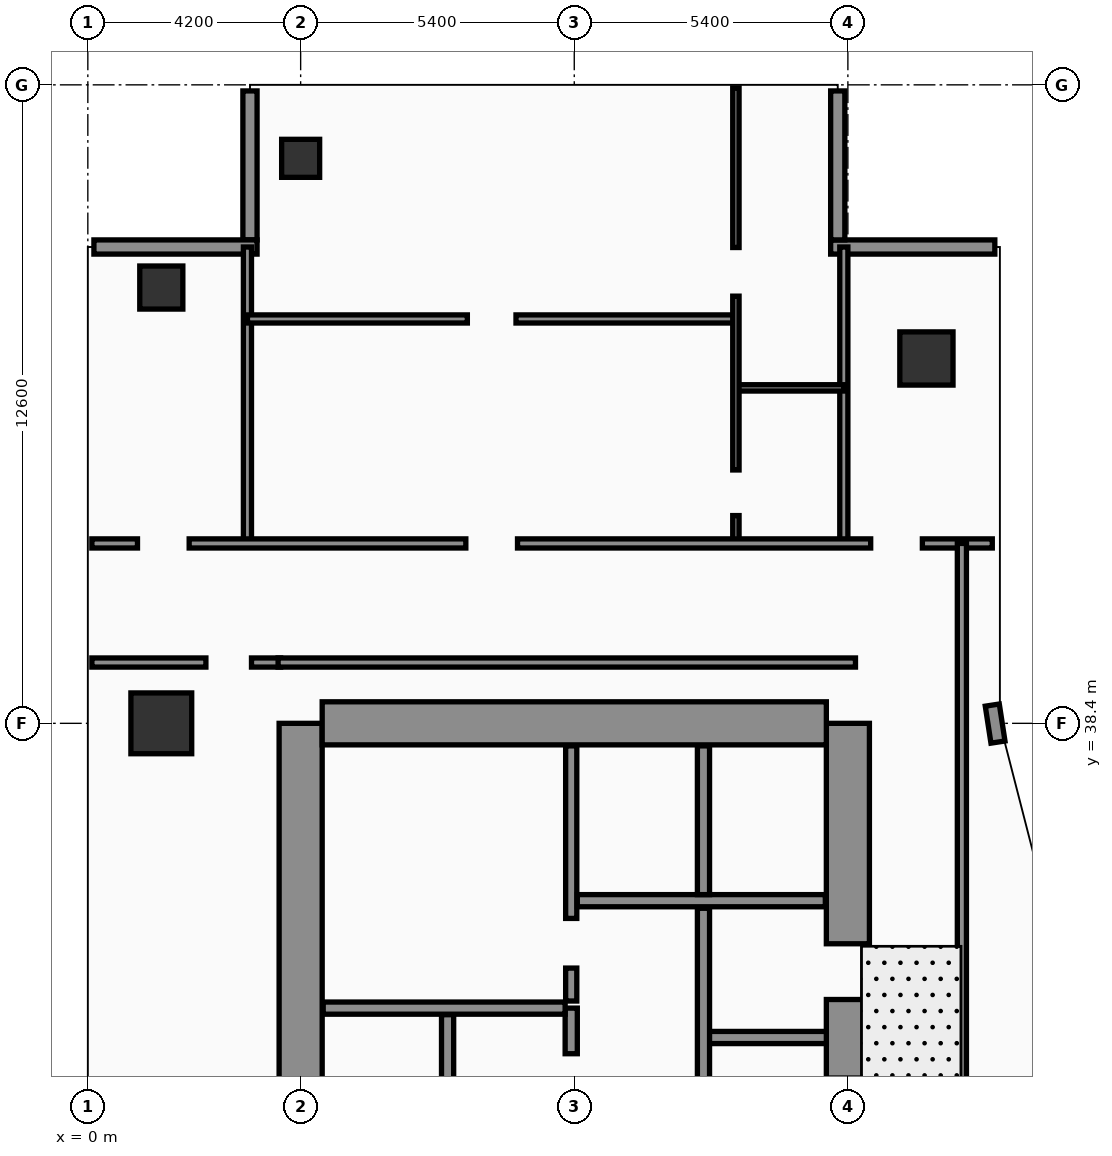
"""IFC4 building model, lengths in metres.
Left out: names, types, materials, properties, quantities, classifications, styles, units other than length and angle.
Written with IfcOpenShell. Run it as: python <this file> out.ifc"""

import sys

from ifc_helpers import new_model, si_unit, direction, frame, frame_2d, origin, origin_2d, place, context, subcontext, project, spatial, rectangle, hollow_rectangle, extrude, element, fill, save


model = new_model("IFC4")
c1 = context("Model", 3, precision=1e-05, world=origin(), true_north=direction((0.0, 1.0)))
c2 = subcontext(c1, "Body", "Model", "MODEL_VIEW")
j1 = project(units=[si_unit("LENGTHUNIT", "METRE"), si_unit("PLANEANGLEUNIT", "RADIAN")], contexts=[c1])
p1 = place(None, origin())
s1 = spatial("IfcSite", under=j1, at=p1, CompositionType="ELEMENT")
p2 = place(p1, origin())
s2 = spatial("IfcBuilding", under=s1, at=p2, CompositionType="ELEMENT")
p3 = place(p2, frame((0.0, 0.0, 171.3)))
s3 = spatial("IfcBuildingStorey", under=s2, at=p3, CompositionType="ELEMENT", Elevation=171.3)
p4 = place(p3, frame((4.2, 16.8, 0.0), z_axis=(0.0, 0.0, 1.0), x_axis=(0.0, 1.0, 0.0)))
e1 = element("IfcWall", 1, at=p4, inside=s3, PredefinedType="SHEAR", context=c2, shape_type="SweptSolid", body=[
    extrude(rectangle(XDim=21.6, YDim=0.85, at=frame_2d((10.8, 0.0))), origin(), (0.0, 0.0, 1.0), 3.56),
])
p5 = place(p3, frame((15.0, 16.8, 0.0), z_axis=(0.0, 0.0, 1.0), x_axis=(0.0, 1.0, 0.0)))
e2 = element("IfcWall", 2, at=p5, inside=s3, PredefinedType="SHEAR", context=c2, shape_type="SweptSolid", body=[
    extrude(rectangle(XDim=21.6, YDim=0.85, at=frame_2d((10.8, 0.0))), origin(), (0.0, 0.0, 1.0), 3.56),
])
p6 = place(p5, frame((8.65, 0.0, 0.0)))
e3 = element("IfcOpeningElement", 3, at=p6, cuts=e2, PredefinedType="OPENING", context=c2, shape_type="SweptSolid", body=[
    extrude(rectangle(XDim=1.1, YDim=2.2, at=frame_2d((0.55, 1.1))), frame((0.0, 0.435, 0.0), z_axis=(0.0, -1.0, 0.0), x_axis=(1.0, 0.0, 0.0)), (0.0, 0.0, 1.0), 0.87),
])
p7 = place(p5, frame((10.85, 0.0, 0.0)))
e4 = element("IfcOpeningElement", 4, at=p7, cuts=e2, PredefinedType="OPENING", context=c2, shape_type="SweptSolid", body=[
    extrude(rectangle(XDim=1.1, YDim=2.2, at=frame_2d((0.55, 1.1))), frame((0.0, 0.435, 0.0), z_axis=(0.0, -1.0, 0.0), x_axis=(1.0, 0.0, 0.0)), (0.0, 0.0, 1.0), 0.87),
])
p8 = place(p5, frame((13.5, 0.0, 0.0)))
e5 = element("IfcOpeningElement", 5, at=p8, cuts=e2, PredefinedType="OPENING", context=c2, shape_type="SweptSolid", body=[
    extrude(rectangle(XDim=1.1, YDim=2.2, at=frame_2d((0.55, 1.1))), frame((0.0, 0.435, 0.0), z_axis=(0.0, -1.0, 0.0), x_axis=(1.0, 0.0, 0.0)), (0.0, 0.0, 1.0), 0.87),
])
p9 = place(p5, frame((16.15, 0.0, 0.0)))
e6 = element("IfcOpeningElement", 6, at=p9, cuts=e2, PredefinedType="OPENING", context=c2, shape_type="SweptSolid", body=[
    extrude(rectangle(XDim=1.1, YDim=2.2, at=frame_2d((0.55, 1.1))), frame((0.0, 0.435, 0.0), z_axis=(0.0, -1.0, 0.0), x_axis=(1.0, 0.0, 0.0)), (0.0, 0.0, 1.0), 0.87),
])
p10 = place(p3, frame((4.625, 38.4, 0.0), z_axis=(0.0, 0.0, 1.0), x_axis=(1.0, 0.0, 0.0)))
e7 = element("IfcWall", 7, at=p10, inside=s3, PredefinedType="SHEAR", context=c2, shape_type="SweptSolid", body=[
    extrude(rectangle(XDim=9.95, YDim=0.85, at=frame_2d((4.975, 0.0))), origin(), (0.0, 0.0, 1.0), 3.56),
])
p11 = place(p3, frame((12.18, 32.2, 0.0), z_axis=(0.0, 0.0, 1.0), x_axis=(1.0, 0.0, 0.0)))
e8 = element("IfcWall", 8, at=p11, inside=s3, PredefinedType="SOLIDWALL", context=c2, shape_type="SweptSolid", body=[
    extrude(rectangle(XDim=2.395, YDim=0.24, at=frame_2d((1.198, 0.0))), origin(), (0.0, 0.0, 1.0), 3.56),
])
p12 = place(p3, frame((1.45, 38.4, 0.0), z_axis=(0.0, 0.0, 1.0), x_axis=(1.0, 0.0, 0.0)))
e9 = element("IfcColumn", 9, at=p12, inside=s3, PredefinedType="COLUMN", context=c2, shape_type="SweptSolid", body=[
    extrude(rectangle(XDim=1.2, YDim=1.2, at=origin_2d()), origin(), (0.0, 0.0, 1.0), 3.56),
])
p13 = place(p3, frame((1.45, 47.0, 0.0), z_axis=(0.0, 0.0, 1.0), x_axis=(1.0, 0.0, 0.0)))
e10 = element("IfcColumn", 10, at=p13, inside=s3, PredefinedType="COLUMN", context=c2, shape_type="SweptSolid", body=[
    extrude(hollow_rectangle(XDim=0.85, YDim=0.85, WallThickness=0.036, at=origin_2d()), origin(), (0.0, 0.0, 1.0), 3.56),
])
p14 = place(p3, frame((4.2, 49.55, 0.0), z_axis=(0.0, 0.0, 1.0), x_axis=(1.0, 0.0, 0.0)))
e11 = element("IfcColumn", 11, at=p14, inside=s3, PredefinedType="COLUMN", context=c2, shape_type="SweptSolid", body=[
    extrude(hollow_rectangle(XDim=0.75, YDim=0.75, WallThickness=0.032, at=origin_2d()), origin(), (0.0, 0.0, 1.0), 3.56),
])
p15 = place(p3, frame((16.55, 45.6, 0.0), z_axis=(0.0, 0.0, 1.0), x_axis=(1.0, 0.0, 0.0)))
e12 = element("IfcColumn", 12, at=p15, inside=s3, PredefinedType="COLUMN", context=c2, shape_type="SweptSolid", body=[
    extrude(rectangle(XDim=1.05, YDim=1.05, at=origin_2d()), origin(), (0.0, 0.0, 1.0), 3.56),
])
p16 = place(p3, frame((17.962, 38.03, 0.0), z_axis=(0.0, 0.0, 1.0), x_axis=(-0.15141125477, 0.988470855377, 0.0)))
e13 = element("IfcWall", 13, at=p16, inside=s3, PredefinedType="SOLIDWALL", context=c2, shape_type="SweptSolid", body=[
    extrude(rectangle(XDim=0.739, YDim=0.28, at=frame_2d((0.369, 0.0))), origin(), (0.0, 0.0, 1.0), 3.56),
])
p17 = place(p3, frame((17.9, 47.8, 0.0), z_axis=(0.0, 0.0, 1.0), x_axis=(-1.0, 0.0, 0.0)))
e14 = element("IfcWall", 14, at=p17, inside=s3, PredefinedType="SOLIDWALL", context=c2, shape_type="SweptSolid", body=[
    extrude(rectangle(XDim=3.24, YDim=0.28, at=frame_2d((1.62, 0.0))), origin(), (0.0, 0.0, 1.0), 3.56),
])
p18 = place(p3, frame((14.8, 47.94, 0.0), z_axis=(0.0, 0.0, 1.0), x_axis=(0.0, 1.0, 0.0)))
e15 = element("IfcWall", 15, at=p18, inside=s3, PredefinedType="SOLIDWALL", context=c2, shape_type="SweptSolid", body=[
    extrude(rectangle(XDim=2.94, YDim=0.28, at=frame_2d((1.47, 0.0))), origin(), (0.0, 0.0, 1.0), 3.56),
])
p19 = place(p3, frame((3.2, 50.88, 0.0), z_axis=(0.0, 0.0, 1.0), x_axis=(0.0, -1.0, 0.0)))
e16 = element("IfcWall", 16, at=p19, inside=s3, PredefinedType="SOLIDWALL", context=c2, shape_type="SweptSolid", body=[
    extrude(rectangle(XDim=2.94, YDim=0.28, at=frame_2d((1.47, 0.0))), origin(), (0.0, 0.0, 1.0), 3.04),
])
p20 = place(p3, frame((3.34, 47.8, 0.0), z_axis=(0.0, 0.0, 1.0), x_axis=(-1.0, 0.0, 0.0)))
e17 = element("IfcWall", 17, at=p20, inside=s3, PredefinedType="SOLIDWALL", context=c2, shape_type="SweptSolid", body=[
    extrude(rectangle(XDim=3.22, YDim=0.28, at=frame_2d((1.61, 0.0))), origin(), (0.0, 0.0, 1.0), 3.04),
])
p21 = place(p3, frame((7.1, 30.02, 0.0), z_axis=(0.0, 0.0, 1.0), x_axis=(0.0, 1.0, 0.0)))
e18 = element("IfcWall", 18, at=p21, inside=s3, PredefinedType="SOLIDWALL", context=c2, shape_type="SweptSolid", body=[
    extrude(rectangle(XDim=2.63, YDim=0.24, at=frame_2d((1.315, 0.0))), origin(), (0.0, 0.0, 1.0), 3.56),
])
p22 = place(p3, frame((9.54, 29.88, 0.0), z_axis=(0.0, 0.0, 1.0), x_axis=(0.0, 1.0, 0.0)))
e19 = element("IfcWall", 19, at=p22, inside=s3, PredefinedType="SOLIDWALL", context=c2, shape_type="SweptSolid", body=[
    extrude(rectangle(XDim=2.9, YDim=0.24, at=frame_2d((1.45, 0.0))), origin(), (0.0, 0.0, 1.0), 3.56),
])
p23 = place(p22, frame((0.7, 0.0, 0.0)))
e20 = element("IfcOpeningElement", 20, at=p23, cuts=e19, PredefinedType="OPENING", context=c2, shape_type="SweptSolid", body=[
    extrude(rectangle(XDim=1.3, YDim=2.35, at=frame_2d((0.65, 1.175))), frame((0.0, 0.13, 0.0), z_axis=(0.0, -1.0, 0.0), x_axis=(1.0, 0.0, 0.0)), (0.0, 0.0, 1.0), 0.26),
])
p24 = place(p3, frame((4.645, 32.78, 0.0), z_axis=(0.0, 0.0, 1.0), x_axis=(1.0, 0.0, 0.0)))
e21 = element("IfcWall", 21, at=p24, inside=s3, PredefinedType="SOLIDWALL", context=c2, shape_type="SweptSolid", body=[
    extrude(rectangle(XDim=4.775, YDim=0.24, at=frame_2d((2.387, 0.0))), origin(), (0.0, 0.0, 1.0), 3.19),
])
p25 = place(p3, frame((9.54, 32.92, 0.0), z_axis=(0.0, 0.0, 1.0), x_axis=(0.0, 1.0, 0.0)))
e22 = element("IfcWall", 22, at=p25, inside=s3, PredefinedType="SOLIDWALL", context=c2, shape_type="SweptSolid", body=[
    extrude(rectangle(XDim=5.035, YDim=0.22, at=frame_2d((2.518, 0.0))), origin(), (0.0, 0.0, 1.0), 3.56),
])
p26 = place(p25, frame((0.65, 0.0, 0.0)))
e23 = element("IfcOpeningElement", 23, at=p26, cuts=e22, PredefinedType="OPENING", context=c2, shape_type="SweptSolid", body=[
    extrude(rectangle(XDim=0.98, YDim=2.15, at=frame_2d((0.49, 1.075))), frame((0.0, 0.12, 0.0), z_axis=(0.0, -1.0, 0.0), x_axis=(1.0, 0.0, 0.0)), (0.0, 0.0, 1.0), 0.24),
])
p27 = place(p3, frame((12.15, 27.0, 0.0), z_axis=(0.0, 0.0, 1.0), x_axis=(0.0, 1.0, 0.0)))
e24 = element("IfcWall", 24, at=p27, inside=s3, PredefinedType="SOLIDWALL", context=c2, shape_type="SweptSolid", body=[
    extrude(rectangle(XDim=7.75, YDim=0.24, at=frame_2d((3.875, 0.0))), origin(), (0.0, 0.0, 1.0), 3.56),
])
p28 = place(p3, frame((9.66, 34.9, 0.0), z_axis=(0.0, 0.0, 1.0), x_axis=(1.0, 0.0, 0.0)))
e25 = element("IfcWall", 25, at=p28, inside=s3, PredefinedType="SOLIDWALL", context=c2, shape_type="SweptSolid", body=[
    extrude(rectangle(XDim=4.895, YDim=0.24, at=frame_2d((2.448, 0.0))), origin(), (0.0, 0.0, 1.0), 3.56),
])
p29 = place(p3, frame((12.15, 35.02, 0.0), z_axis=(0.0, 0.0, 1.0), x_axis=(0.0, 1.0, 0.0)))
e26 = element("IfcWall", 26, at=p29, inside=s3, PredefinedType="SOLIDWALL", context=c2, shape_type="SweptSolid", body=[
    extrude(rectangle(XDim=2.935, YDim=0.24, at=frame_2d((1.468, 0.0))), origin(), (0.0, 0.0, 1.0), 3.56),
])
p30 = place(p3, frame((0.08, 39.6, 0.0), z_axis=(0.0, 0.0, 1.0), x_axis=(1.0, 0.0, 0.0)))
e27 = element("IfcWall", 27, at=p30, inside=s3, PredefinedType="PARTITIONING", context=c2, shape_type="SweptSolid", body=[
    extrude(rectangle(XDim=3.725, YDim=0.18, at=frame_2d((1.862, 0.0))), origin(), (0.0, 0.0, 1.0), 2.94),
])
p31 = place(p30, frame((2.25, 0.0, 0.0)))
e28 = element("IfcOpeningElement", 28, at=p31, cuts=e27, PredefinedType="OPENING", context=c2, shape_type="SweptSolid", body=[
    extrude(rectangle(XDim=0.9, YDim=2.15, at=frame_2d((0.45, 1.075))), frame((0.0, 0.1, 0.0), z_axis=(0.0, -1.0, 0.0), x_axis=(1.0, 0.0, 0.0)), (0.0, 0.0, 1.0), 0.2),
])
p32 = place(p3, frame((3.15, 41.95, 0.0), z_axis=(0.0, 0.0, 1.0), x_axis=(0.0, 1.0, 0.0)))
e29 = element("IfcWall", 29, at=p32, inside=s3, PredefinedType="PARTITIONING", context=c2, shape_type="SweptSolid", body=[
    extrude(rectangle(XDim=5.85, YDim=0.16, at=frame_2d((2.925, 0.0))), origin(), (0.0, 0.0, 1.0), 3.14),
])
p33 = place(p3, frame((14.92, 41.95, 0.0), z_axis=(0.0, 0.0, 1.0), x_axis=(0.0, 1.0, 0.0)))
e30 = element("IfcWall", 30, at=p33, inside=s3, PredefinedType="PARTITIONING", context=c2, shape_type="SweptSolid", body=[
    extrude(rectangle(XDim=5.85, YDim=0.16, at=frame_2d((2.925, 0.0))), origin(), (0.0, 0.0, 1.0), 3.04),
])
p34 = place(p3, frame((12.79, 45.02, 0.0), z_axis=(0.0, 0.0, 1.0), x_axis=(1.0, 0.0, 0.0)))
e31 = element("IfcWall", 31, at=p34, inside=s3, PredefinedType="PARTITIONING", context=c2, shape_type="SweptSolid", body=[
    extrude(rectangle(XDim=2.13, YDim=0.125, at=frame_2d((1.065, 0.0))), origin(), (0.0, 0.0, 1.0), 3.56),
])
p35 = place(p3, frame((3.15, 46.38, 0.0), z_axis=(0.0, 0.0, 1.0), x_axis=(1.0, 0.0, 0.0)))
e32 = element("IfcWall", 32, at=p35, inside=s3, PredefinedType="PARTITIONING", context=c2, shape_type="SweptSolid", body=[
    extrude(rectangle(XDim=9.64, YDim=0.16, at=frame_2d((4.82, 0.0))), origin(), (0.0, 0.0, 1.0), 2.94),
])
p36 = place(p35, frame((4.34, 0.0, 0.0)))
e33 = element("IfcOpeningElement", 33, at=p36, cuts=e32, PredefinedType="OPENING", context=c2, shape_type="SweptSolid", body=[
    extrude(rectangle(XDim=0.96, YDim=2.2, at=frame_2d((0.48, 1.1))), frame((0.0, 0.09, 0.0), z_axis=(0.0, -1.0, 0.0), x_axis=(1.0, 0.0, 0.0)), (0.0, 0.0, 1.0), 0.18),
])
p37 = place(p3, frame((12.79, 41.95, 0.0), z_axis=(0.0, 0.0, 1.0), x_axis=(0.0, 1.0, 0.0)))
e34 = element("IfcWall", 34, at=p37, inside=s3, PredefinedType="PARTITIONING", context=c2, shape_type="SweptSolid", body=[
    extrude(rectangle(XDim=8.99, YDim=0.125, at=frame_2d((4.495, 0.0))), origin(), (0.0, 0.0, 1.0), 3.04),
])
p38 = place(p37, frame((0.55, 0.0, 0.0)))
e35 = element("IfcOpeningElement", 35, at=p38, cuts=e34, PredefinedType="OPENING", context=c2, shape_type="SweptSolid", body=[
    extrude(rectangle(XDim=0.9, YDim=2.15, at=frame_2d((0.45, 1.075))), frame((0.0, 0.073, 0.0), z_axis=(0.0, -1.0, 0.0), x_axis=(1.0, 0.0, 0.0)), (0.0, 0.0, 1.0), 0.145),
])
p39 = place(p37, frame((4.88, 0.0, 0.0)))
e36 = element("IfcOpeningElement", 36, at=p39, cuts=e34, PredefinedType="OPENING", context=c2, shape_type="SweptSolid", body=[
    extrude(rectangle(XDim=0.96, YDim=2.2, at=frame_2d((0.48, 1.1))), frame((0.0, 0.073, 0.0), z_axis=(0.0, -1.0, 0.0), x_axis=(1.0, 0.0, 0.0)), (0.0, 0.0, 1.0), 0.145),
])
p40 = place(p3, frame((0.08, 41.95, 0.0), z_axis=(0.0, 0.0, 1.0), x_axis=(1.0, 0.0, 0.0)))
e37 = element("IfcWall", 37, at=p40, inside=s3, PredefinedType="PARTITIONING", context=c2, shape_type="SweptSolid", body=[
    extrude(rectangle(XDim=17.77, YDim=0.18, at=frame_2d((8.885, 0.0))), origin(), (0.0, 0.0, 1.0), 2.94),
])
p41 = place(p40, frame((0.9, 0.0, 0.0)))
e38 = element("IfcOpeningElement", 38, at=p41, cuts=e37, PredefinedType="OPENING", context=c2, shape_type="SweptSolid", body=[
    extrude(rectangle(XDim=1.02, YDim=2.2, at=frame_2d((0.51, 1.1))), frame((0.0, 0.1, 0.0), z_axis=(0.0, -1.0, 0.0), x_axis=(1.0, 0.0, 0.0)), (0.0, 0.0, 1.0), 0.2),
])
p42 = place(p40, frame((7.38, 0.0, 0.0)))
e39 = element("IfcOpeningElement", 39, at=p42, cuts=e37, PredefinedType="OPENING", context=c2, shape_type="SweptSolid", body=[
    extrude(rectangle(XDim=1.02, YDim=2.2, at=frame_2d((0.51, 1.1))), frame((0.0, 0.1, 0.0), z_axis=(0.0, -1.0, 0.0), x_axis=(1.0, 0.0, 0.0)), (0.0, 0.0, 1.0), 0.2),
])
p43 = place(p40, frame((15.37, 0.0, 0.0)))
e40 = element("IfcOpeningElement", 40, at=p43, cuts=e37, PredefinedType="OPENING", context=c2, shape_type="SweptSolid", body=[
    extrude(rectangle(XDim=1.02, YDim=2.2, at=frame_2d((0.51, 1.1))), frame((0.0, 0.1, 0.0), z_axis=(0.0, -1.0, 0.0), x_axis=(1.0, 0.0, 0.0)), (0.0, 0.0, 1.0), 0.2),
])
p44 = place(p3, frame((17.25, 24.3, 0.0), z_axis=(0.0, 0.0, 1.0), x_axis=(0.0, 1.0, 0.0)))
e41 = element("IfcWall", 41, at=p44, inside=s3, PredefinedType="PARTITIONING", context=c2, shape_type="SweptSolid", body=[
    extrude(rectangle(XDim=17.65, YDim=0.18, at=frame_2d((8.825, 0.0))), origin(), (0.0, 0.0, 1.0), 2.94),
])
p45 = place(p3, frame((3.755, 39.6, 0.0), z_axis=(0.0, 0.0, 1.0), x_axis=(1.0, 0.0, 0.0)))
e42 = element("IfcWall", 42, at=p45, inside=s3, PredefinedType="PARTITIONING", context=c2, shape_type="SweptSolid", body=[
    extrude(rectangle(XDim=11.395, YDim=0.18, at=frame_2d((5.698, 0.0))), origin(), (0.0, 0.0, 1.0), 2.94),
])
p46 = place(p23, origin())
e43 = element("IfcDoor", 43, at=p46, inside=s3, OperationType="DOUBLE_DOOR_SLIDING", PredefinedType="DOOR", context=c2, shape_type="SweptSolid", body=[
    extrude(rectangle(XDim=1.3, YDim=2.35, at=frame_2d((0.65, 1.175))), frame((0.0, 0.025, 0.0), z_axis=(0.0, -1.0, 0.0), x_axis=(1.0, 0.0, 0.0)), (0.0, 0.0, 1.0), 0.05),
])
fill(e20, e43)
p47 = place(p26, origin())
e44 = element("IfcDoor", 44, at=p47, inside=s3, OperationType="SINGLE_SWING_LEFT", PredefinedType="DOOR", context=c2, shape_type="SweptSolid", body=[
    extrude(rectangle(XDim=0.98, YDim=2.15, at=frame_2d((0.49, 1.075))), frame((0.0, 0.025, 0.0), z_axis=(0.0, -1.0, 0.0), x_axis=(1.0, 0.0, 0.0)), (0.0, 0.0, 1.0), 0.05),
])
fill(e23, e44)
p48 = place(p31, origin())
e45 = element("IfcDoor", 45, at=p48, inside=s3, OperationType="SINGLE_SWING_LEFT", PredefinedType="DOOR", context=c2, shape_type="SweptSolid", body=[
    extrude(rectangle(XDim=0.9, YDim=2.15, at=frame_2d((0.45, 1.075))), frame((0.0, 0.025, 0.0), z_axis=(0.0, -1.0, 0.0), x_axis=(1.0, 0.0, 0.0)), (0.0, 0.0, 1.0), 0.05),
])
fill(e28, e45)
p49 = place(p36, origin())
e46 = element("IfcDoor", 46, at=p49, inside=s3, OperationType="SINGLE_SWING_LEFT", PredefinedType="DOOR", context=c2, shape_type="SweptSolid", body=[
    extrude(rectangle(XDim=0.96, YDim=2.2, at=frame_2d((0.48, 1.1))), frame((0.0, 0.025, 0.0), z_axis=(0.0, -1.0, 0.0), x_axis=(1.0, 0.0, 0.0)), (0.0, 0.0, 1.0), 0.05),
])
fill(e33, e46)
p50 = place(p38, origin())
e47 = element("IfcDoor", 47, at=p50, inside=s3, OperationType="SINGLE_SWING_LEFT", PredefinedType="DOOR", context=c2, shape_type="SweptSolid", body=[
    extrude(rectangle(XDim=0.9, YDim=2.15, at=frame_2d((0.45, 1.075))), frame((0.0, 0.025, 0.0), z_axis=(0.0, -1.0, 0.0), x_axis=(1.0, 0.0, 0.0)), (0.0, 0.0, 1.0), 0.05),
])
fill(e35, e47)
p51 = place(p39, origin())
e48 = element("IfcDoor", 48, at=p51, inside=s3, OperationType="SINGLE_SWING_RIGHT", PredefinedType="DOOR", context=c2, shape_type="SweptSolid", body=[
    extrude(rectangle(XDim=0.96, YDim=2.2, at=frame_2d((0.48, 1.1))), frame((0.0, 0.025, 0.0), z_axis=(0.0, -1.0, 0.0), x_axis=(1.0, 0.0, 0.0)), (0.0, 0.0, 1.0), 0.05),
])
fill(e36, e48)
p52 = place(p41, origin())
e49 = element("IfcDoor", 49, at=p52, inside=s3, OperationType="SINGLE_SWING_LEFT", PredefinedType="DOOR", context=c2, shape_type="SweptSolid", body=[
    extrude(rectangle(XDim=1.02, YDim=2.2, at=frame_2d((0.51, 1.1))), frame((0.0, 0.025, 0.0), z_axis=(0.0, -1.0, 0.0), x_axis=(1.0, 0.0, 0.0)), (0.0, 0.0, 1.0), 0.05),
])
fill(e38, e49)
p53 = place(p42, origin())
e50 = element("IfcDoor", 50, at=p53, inside=s3, OperationType="SINGLE_SWING_RIGHT", PredefinedType="DOOR", context=c2, shape_type="SweptSolid", body=[
    extrude(rectangle(XDim=1.02, YDim=2.2, at=frame_2d((0.51, 1.1))), frame((0.0, 0.025, 0.0), z_axis=(0.0, -1.0, 0.0), x_axis=(1.0, 0.0, 0.0)), (0.0, 0.0, 1.0), 0.05),
])
fill(e39, e50)
p54 = place(p43, origin())
e51 = element("IfcDoor", 51, at=p54, inside=s3, OperationType="SINGLE_SWING_RIGHT", PredefinedType="DOOR", context=c2, shape_type="SweptSolid", body=[
    extrude(rectangle(XDim=1.02, YDim=2.2, at=frame_2d((0.51, 1.1))), frame((0.0, 0.025, 0.0), z_axis=(0.0, -1.0, 0.0), x_axis=(1.0, 0.0, 0.0)), (0.0, 0.0, 1.0), 0.05),
])
fill(e40, e51)
p55 = place(p9, origin())
e52 = element("IfcDoor", 52, at=p55, inside=s3, OperationType="DOUBLE_DOOR_SLIDING", PredefinedType="DOOR", context=c2, shape_type="SweptSolid", body=[
    extrude(rectangle(XDim=1.1, YDim=2.2, at=frame_2d((0.55, 1.1))), frame((0.0, 0.025, 0.0), z_axis=(0.0, -1.0, 0.0), x_axis=(1.0, 0.0, 0.0)), (0.0, 0.0, 1.0), 0.05),
])
fill(e6, e52)
save(model, sys.argv[1])
